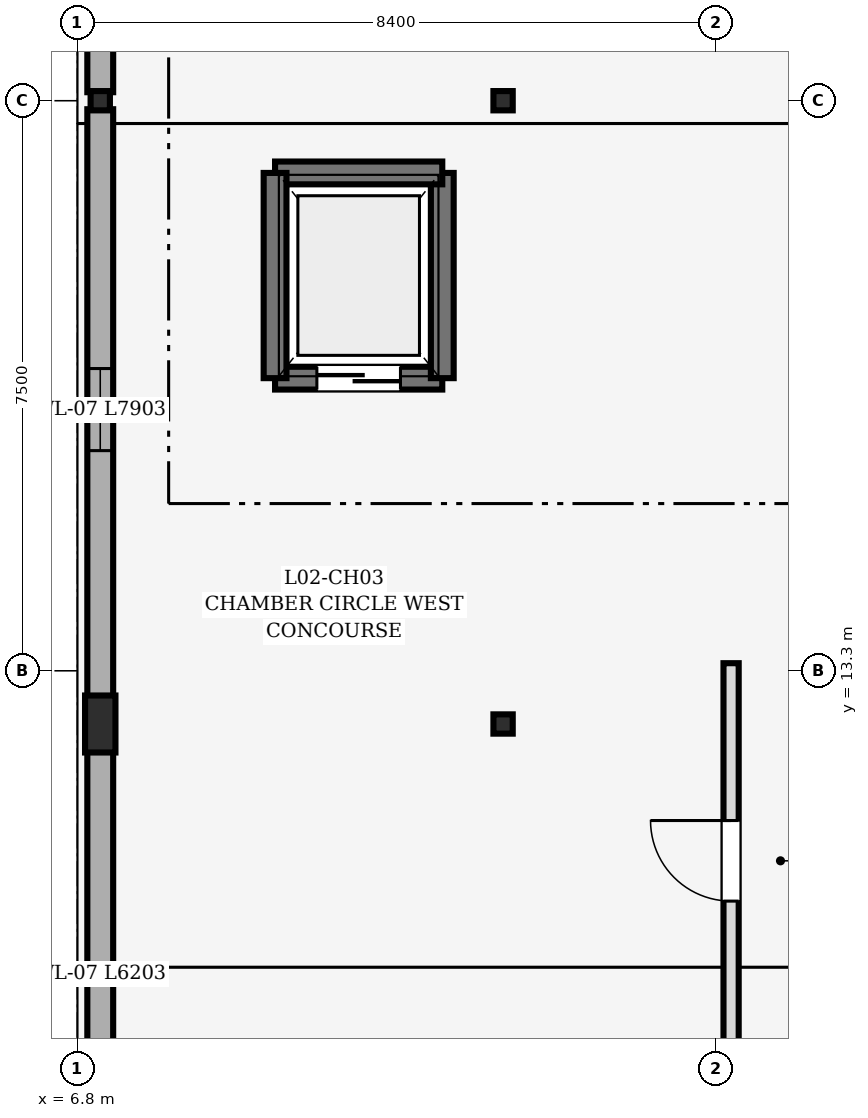
"""IFC4 building model, lengths in metres.
Left out: names, types, materials, properties, quantities, classifications, styles, units other than length and angle.
Written with IfcOpenShell. Run it as: python <this file> out.ifc"""

import sys

from ifc_helpers import new_model, si_unit, direction, frame, frame_2d, origin, origin_2d, place, context, subcontext, project, spatial, rectangle, i_section, extrude, element, fill, save


model = new_model("IFC4")
c1 = context("Model", 3, precision=1e-05, world=origin(), true_north=direction((0.0, 1.0)))
c2 = subcontext(c1, "Body", "Model", "MODEL_VIEW")
j1 = project(units=[si_unit("LENGTHUNIT", "METRE"), si_unit("PLANEANGLEUNIT", "RADIAN")], contexts=[c1])
p1 = place(None, origin())
s1 = spatial("IfcSite", under=j1, at=p1, CompositionType="ELEMENT")
p2 = place(p1, origin())
s2 = spatial("IfcBuilding", under=s1, at=p2, CompositionType="ELEMENT")
p3 = place(p2, frame((0.0, 0.0, 5.4)))
s3 = spatial("IfcBuildingStorey", under=s2, at=p3, CompositionType="ELEMENT", Elevation=5.4)
p4 = place(p3, frame((7.1, 12.6, 0.0), z_axis=(0.0, 0.0, 1.0), x_axis=(1.0, 0.0, 0.0)))
e1 = element("IfcColumn", 1, at=p4, inside=s3, PredefinedType="PILASTER", context=c2, shape_type="SweptSolid", body=[
    extrude(rectangle(XDim=0.4, YDim=0.75, at=origin_2d()), origin(), (0.0, 0.0, 1.0), 4.8),
])
for number, where, z_axis, x_axis in (
    (2, (7.1, 20.8, 0.0), (0.0, 0.0, 1.0), (1.0, 0.0, 0.0)),
    (3, (12.4, 12.6, 0.0), (0.0, 0.0, 1.0), (1.0, 0.0, 0.0)),
    (4, (12.4, 20.8, 0.0), (0.0, 0.0, 1.0), (1.0, 0.0, 0.0)),
):
    element("IfcColumn", number, at=place(p3, frame(where, z_axis=z_axis, x_axis=x_axis)), inside=s3, PredefinedType="COLUMN", context=c2, shape_type="SweptSolid", body=[
        extrude(i_section(OverallWidth=0.254, OverallDepth=0.254, WebThickness=0.009, FlangeThickness=0.014, at=origin_2d()), origin(), (0.0, 0.0, 1.0), 4.8),
    ])
p5 = place(p3, frame((7.1, 6.212, 0.0), z_axis=(0.0, 0.0, 1.0), x_axis=(0.0, 1.0, 0.0)))
e5 = element("IfcWall", 5, at=p5, inside=s3, PredefinedType="STANDARD", context=c2, shape_type="SweptSolid", body=[
    extrude(rectangle(XDim=6.203, YDim=0.34, at=frame_2d((3.102, 0.0))), origin(), (0.0, 0.0, 1.0), 3.777),
])
p6 = place(p3, frame((7.1, 12.785, 0.0), z_axis=(0.0, 0.0, 1.0), x_axis=(0.0, 1.0, 0.0)))
e6 = element("IfcWall", 6, at=p6, inside=s3, PredefinedType="STANDARD", context=c2, shape_type="SweptSolid", body=[
    extrude(rectangle(XDim=7.903, YDim=0.34, at=frame_2d((3.952, 0.0))), origin(), (0.0, 0.0, 1.0), 3.777),
])
p7 = place(p6, frame((3.412, 0.0, 0.85)))
e7 = element("IfcOpeningElement", 7, at=p7, cuts=e6, PredefinedType="OPENING", context=c2, shape_type="SweptSolid", body=[
    extrude(rectangle(XDim=1.08, YDim=1.5, at=frame_2d((0.54, 0.75))), frame((0.0, 0.182, 0.0), z_axis=(0.0, -1.0, 0.0), x_axis=(1.0, 0.0, 0.0)), (0.0, 0.0, 1.0), 0.364),
])
p8 = place(p3, frame((7.1, 20.912, 0.0), z_axis=(0.0, 0.0, 1.0), x_axis=(0.0, 1.0, 0.0)))
e8 = element("IfcWall", 8, at=p8, inside=s3, PredefinedType="STANDARD", context=c2, shape_type="SweptSolid", body=[
    extrude(rectangle(XDim=6.903, YDim=0.34, at=frame_2d((3.451, 0.0))), origin(), (0.0, 0.0, 1.0), 3.827),
])
p9 = place(p8, frame((2.771, 0.0, 0.85)))
e9 = element("IfcOpeningElement", 9, at=p9, cuts=e8, PredefinedType="OPENING", context=c2, shape_type="SweptSolid", body=[
    extrude(rectangle(XDim=1.36, YDim=1.5, at=frame_2d((0.68, 0.75))), frame((0.0, 0.182, 0.0), z_axis=(0.0, -1.0, 0.0), x_axis=(1.0, 0.0, 0.0)), (0.0, 0.0, 1.0), 0.364),
])
p10 = place(p3, frame((11.6, 17.15, 0.0), z_axis=(0.0, 0.0, 1.0), x_axis=(-1.0, 0.0, 0.0)))
e10 = element("IfcWall", 10, at=p10, inside=s3, PredefinedType="SHEAR", context=c2, shape_type="SweptSolid", body=[
    extrude(rectangle(XDim=2.2, YDim=0.3, at=frame_2d((1.1, 0.0))), origin(), (0.0, 0.0, 1.0), 4.54),
])
p11 = place(p10, frame((0.55, 0.0, 0.0)))
e11 = element("IfcOpeningElement", 11, at=p11, cuts=e10, PredefinedType="OPENING", context=c2, shape_type="SweptSolid", body=[
    extrude(rectangle(XDim=1.1, YDim=2.15, at=frame_2d((0.55, 1.075))), frame((0.0, 0.162, 0.0), z_axis=(0.0, -1.0, 0.0), x_axis=(1.0, 0.0, 0.0)), (0.0, 0.0, 1.0), 0.324),
])
p12 = place(p3, frame((11.6, 19.85, 0.0), z_axis=(0.0, 0.0, 1.0), x_axis=(0.0, -1.0, 0.0)))
e12 = element("IfcWall", 12, at=p12, inside=s3, PredefinedType="SHEAR", context=c2, shape_type="SweptSolid", body=[
    extrude(rectangle(XDim=2.7, YDim=0.3, at=frame_2d((1.35, 0.0))), origin(), (0.0, 0.0, 1.0), 4.54),
])
p13 = place(p3, frame((9.4, 19.85, 0.0), z_axis=(0.0, 0.0, 1.0), x_axis=(1.0, 0.0, 0.0)))
e13 = element("IfcWall", 13, at=p13, inside=s3, PredefinedType="SHEAR", context=c2, shape_type="SweptSolid", body=[
    extrude(rectangle(XDim=2.2, YDim=0.3, at=frame_2d((1.1, 0.0))), origin(), (0.0, 0.0, 1.0), 4.54),
])
p14 = place(p3, frame((9.4, 17.15, 0.0), z_axis=(0.0, 0.0, 1.0), x_axis=(0.0, 1.0, 0.0)))
e14 = element("IfcWall", 14, at=p14, inside=s3, PredefinedType="SHEAR", context=c2, shape_type="SweptSolid", body=[
    extrude(rectangle(XDim=2.7, YDim=0.3, at=frame_2d((1.35, 0.0))), origin(), (0.0, 0.0, 1.0), 4.54),
])
p15 = place(p3, frame((15.4, 8.2, 0.0), z_axis=(0.0, 0.0, 1.0), x_axis=(0.0, 1.0, 0.0)))
e15 = element("IfcWall", 15, at=p15, inside=s3, PredefinedType="PARTITIONING", context=c2, shape_type="SweptSolid", body=[
    extrude(rectangle(XDim=5.2, YDim=0.2, at=frame_2d((2.6, 0.0))), origin(), (0.0, 0.0, 1.0), 4.525),
])
p16 = place(p15, frame((2.07, 0.0, 0.0)))
e16 = element("IfcOpeningElement", 16, at=p16, cuts=e15, PredefinedType="OPENING", context=c2, shape_type="SweptSolid", body=[
    extrude(rectangle(XDim=1.06, YDim=2.24, at=frame_2d((0.53, 1.12))), frame((0.0, 0.112, 0.0), z_axis=(0.0, -1.0, 0.0), x_axis=(1.0, 0.0, 0.0)), (0.0, 0.0, 1.0), 0.224),
])
p17 = place(p7, origin())
e17 = element("IfcWindow", 17, at=p17, inside=s3, PartitioningType="DOUBLE_PANEL_VERTICAL", PredefinedType="WINDOW", context=c2, shape_type="SweptSolid", body=[
    extrude(rectangle(XDim=1.08, YDim=1.5, at=frame_2d((0.54, 0.75))), frame((0.0, 0.03, 0.0), z_axis=(0.0, -1.0, 0.0), x_axis=(1.0, 0.0, 0.0)), (0.0, 0.0, 1.0), 0.06),
])
fill(e7, e17)
p18 = place(p11, origin())
e18 = element("IfcDoor", 18, at=p18, inside=s3, OperationType="DOUBLE_DOOR_SLIDING", PredefinedType="DOOR", context=c2, shape_type="SweptSolid", body=[
    extrude(rectangle(XDim=1.1, YDim=2.15, at=frame_2d((0.55, 1.075))), frame((0.0, 0.025, 0.0), z_axis=(0.0, -1.0, 0.0), x_axis=(1.0, 0.0, 0.0)), (0.0, 0.0, 1.0), 0.05),
])
fill(e11, e18)
p19 = place(p16, origin())
e19 = element("IfcDoor", 19, at=p19, inside=s3, OperationType="SINGLE_SWING_RIGHT", PredefinedType="DOOR", context=c2, shape_type="SweptSolid", body=[
    extrude(rectangle(XDim=1.06, YDim=2.24, at=frame_2d((0.53, 1.12))), frame((0.0, 0.025, 0.0), z_axis=(0.0, -1.0, 0.0), x_axis=(1.0, 0.0, 0.0)), (0.0, 0.0, 1.0), 0.05),
])
fill(e16, e19)
save(model, sys.argv[1])
